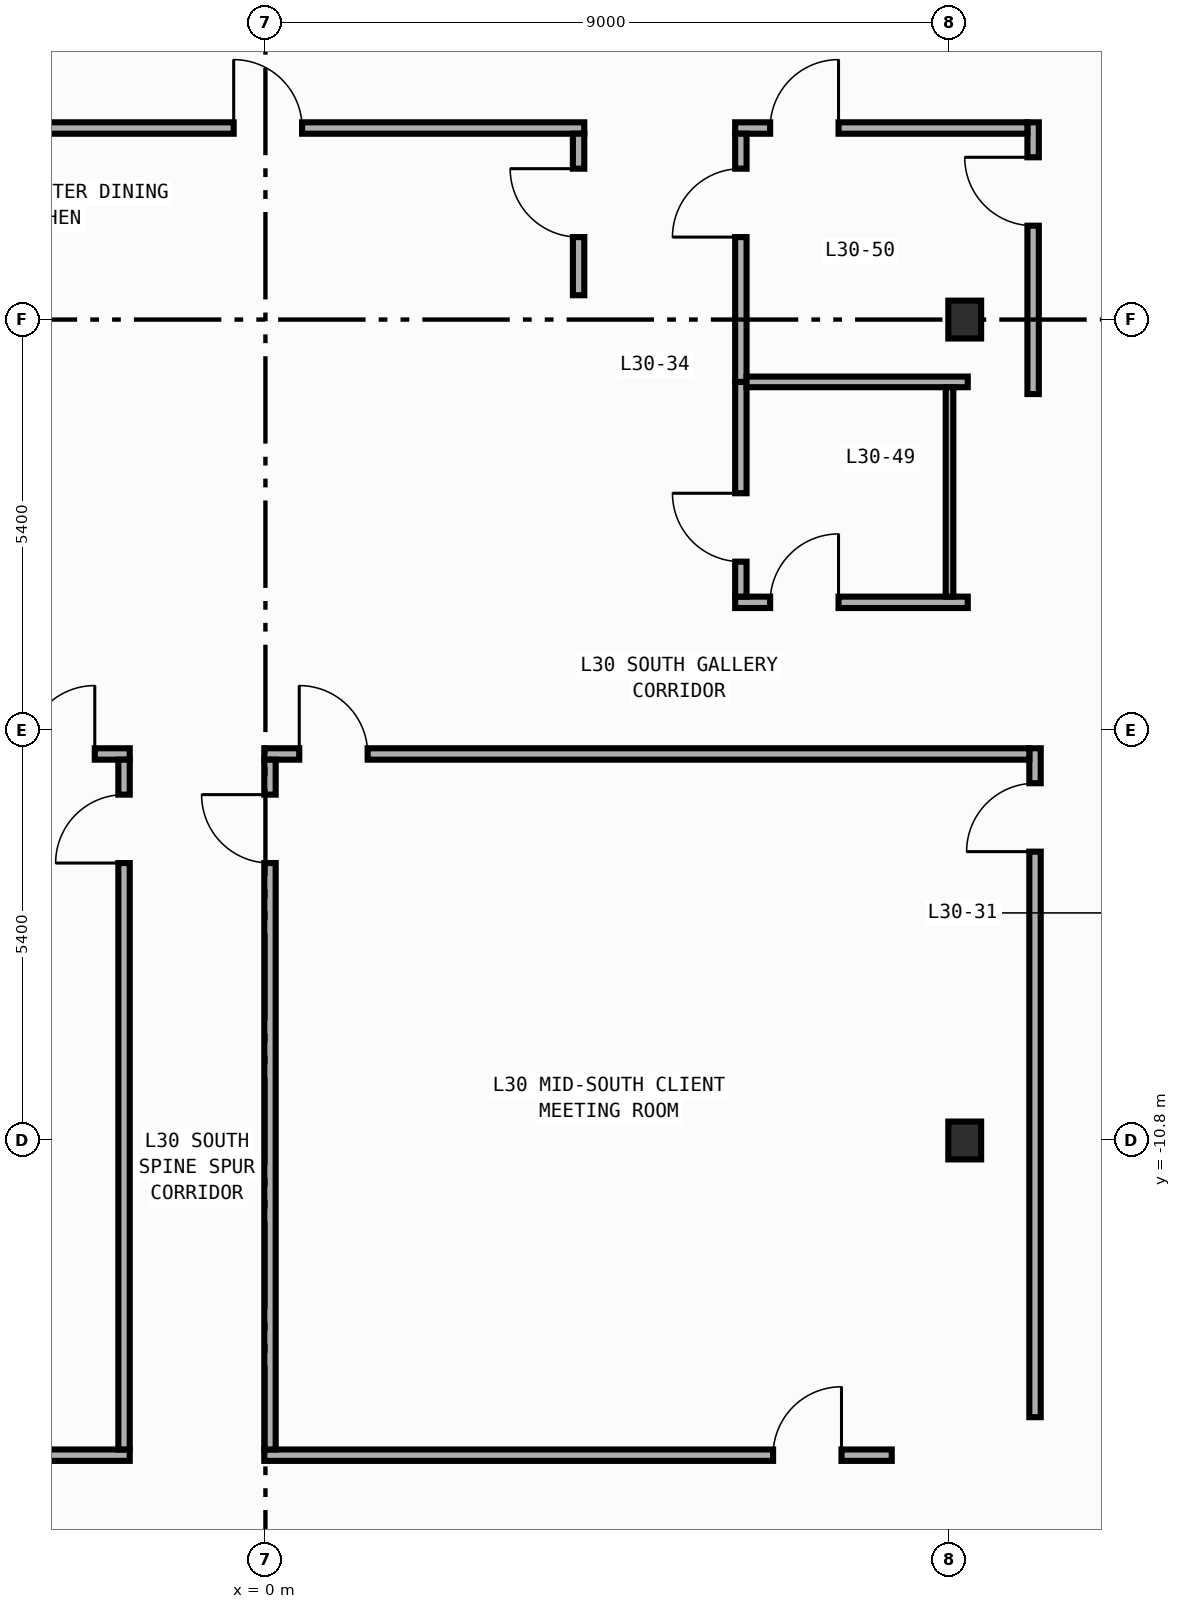
"""IFC4 building model, lengths in metres.
Left out: names, types, materials, properties, quantities, classifications, styles, units other than length and angle.
Written with IfcOpenShell. Run it as: python <this file> out.ifc"""

import sys

from ifc_helpers import new_model, si_unit, direction, frame, frame_2d, origin, origin_2d, place, context, subcontext, project, spatial, rectangle, i_section, extrude, element, fill, save


model = new_model("IFC4")
c1 = context("Model", 3, precision=1e-05, world=origin(), true_north=direction((0.0, 1.0)))
c2 = subcontext(c1, "Body", "Model", "MODEL_VIEW")
j1 = project(units=[si_unit("LENGTHUNIT", "METRE"), si_unit("PLANEANGLEUNIT", "RADIAN")], contexts=[c1])
p1 = place(None, origin())
s1 = spatial("IfcSite", under=j1, at=p1, CompositionType="ELEMENT")
p2 = place(p1, origin())
s2 = spatial("IfcBuilding", under=s1, at=p2, CompositionType="ELEMENT")
p3 = place(p2, frame((0.0, 0.0, 131.0)))
s3 = spatial("IfcBuildingStorey", under=s2, at=p3, CompositionType="ELEMENT", Elevation=131.0)
for number, where, z_axis, x_axis in (
    (1, (9.2, -10.8, 0.0), (0.0, 0.0, 1.0), (1.0, 0.0, 0.0)),
    (2, (9.2, 0.0, 0.0), (0.0, 0.0, 1.0), (1.0, 0.0, 0.0)),
):
    element("IfcColumn", number, at=place(p3, frame(where, z_axis=z_axis, x_axis=x_axis)), inside=s3, PredefinedType="COLUMN", context=c2, shape_type="SweptSolid", body=[
        extrude(i_section(OverallWidth=0.432, OverallDepth=0.498, WebThickness=0.045, FlangeThickness=0.07, FilletRadius=0.022, at=origin_2d()), origin(), (0.0, 0.0, 1.0), 4.2),
    ])
p4 = place(p3, frame((10.1, -0.98, 0.0), z_axis=(0.0, 0.0, 1.0), x_axis=(0.0, 1.0, 0.0)))
e3 = element("IfcWall", 3, at=p4, inside=s3, PredefinedType="PARTITIONING", context=c2, shape_type="SweptSolid", body=[
    extrude(rectangle(XDim=3.575, YDim=0.15, at=frame_2d((1.788, 0.0))), origin(), (0.0, 0.0, 1.0), 3.94),
])
p5 = place(p4, frame((2.215, 0.0, 0.0)))
e4 = element("IfcOpeningElement", 4, at=p5, cuts=e3, PredefinedType="OPENING", context=c2, shape_type="SweptSolid", body=[
    extrude(rectangle(XDim=0.9, YDim=2.15, at=frame_2d((0.45, 1.075))), frame((0.0, 0.085, 0.0), z_axis=(0.0, -1.0, 0.0), x_axis=(1.0, 0.0, 0.0)), (0.0, 0.0, 1.0), 0.17),
])
p6 = place(p3, frame((10.125, -14.44, 0.0), z_axis=(0.0, 0.0, 1.0), x_axis=(0.0, 1.0, 0.0)))
e5 = element("IfcWall", 5, at=p6, inside=s3, PredefinedType="PARTITIONING", context=c2, shape_type="SweptSolid", body=[
    extrude(rectangle(XDim=8.8, YDim=0.15, at=frame_2d((4.4, 0.0))), origin(), (0.0, 0.0, 1.0), 3.94),
])
p7 = place(p6, frame((7.44, 0.0, 0.0)))
e6 = element("IfcOpeningElement", 6, at=p7, cuts=e5, PredefinedType="OPENING", context=c2, shape_type="SweptSolid", body=[
    extrude(rectangle(XDim=0.9, YDim=2.15, at=frame_2d((0.45, 1.075))), frame((0.0, 0.085, 0.0), z_axis=(0.0, -1.0, 0.0), x_axis=(1.0, 0.0, 0.0)), (0.0, 0.0, 1.0), 0.17),
])
p8 = place(p3, frame((6.18, 2.52, 0.0), z_axis=(0.0, 0.0, 1.0), x_axis=(1.0, 0.0, 0.0)))
e7 = element("IfcWall", 7, at=p8, inside=s3, PredefinedType="PARTITIONING", context=c2, shape_type="SweptSolid", body=[
    extrude(rectangle(XDim=3.845, YDim=0.15, at=frame_2d((1.922, 0.0))), origin(), (0.0, 0.0, 1.0), 3.94),
])
p9 = place(p8, frame((0.46, 0.0, 0.0)))
e8 = element("IfcOpeningElement", 8, at=p9, cuts=e7, PredefinedType="OPENING", context=c2, shape_type="SweptSolid", body=[
    extrude(rectangle(XDim=0.9, YDim=2.15, at=frame_2d((0.45, 1.075))), frame((0.0, 0.085, 0.0), z_axis=(0.0, -1.0, 0.0), x_axis=(1.0, 0.0, 0.0)), (0.0, 0.0, 1.0), 0.17),
])
p10 = place(p3, frame((-10.025, 2.52, 0.0), z_axis=(0.0, 0.0, 1.0), x_axis=(1.0, 0.0, 0.0)))
e9 = element("IfcWall", 9, at=p10, inside=s3, PredefinedType="PARTITIONING", context=c2, shape_type="SweptSolid", body=[
    extrude(rectangle(XDim=14.22, YDim=0.15, at=frame_2d((7.11, 0.0))), origin(), (0.0, 0.0, 1.0), 3.94),
])
p11 = place(p10, frame((9.607, 0.0, 0.0)))
e10 = element("IfcOpeningElement", 10, at=p11, cuts=e9, PredefinedType="OPENING", context=c2, shape_type="SweptSolid", body=[
    extrude(rectangle(XDim=0.9, YDim=2.15, at=frame_2d((0.45, 1.075))), frame((0.0, 0.085, 0.0), z_axis=(0.0, -1.0, 0.0), x_axis=(1.0, 0.0, 0.0)), (0.0, 0.0, 1.0), 0.17),
])
p12 = place(p3, frame((6.18, -3.72, 0.0), z_axis=(0.0, 0.0, 1.0), x_axis=(1.0, 0.0, 0.0)))
e11 = element("IfcWall", 11, at=p12, inside=s3, PredefinedType="PARTITIONING", context=c2, shape_type="SweptSolid", body=[
    extrude(rectangle(XDim=3.06, YDim=0.15, at=frame_2d((1.53, 0.0))), origin(), (0.0, 0.0, 1.0), 3.94),
])
p13 = place(p12, frame((0.46, 0.0, 0.0)))
e12 = element("IfcOpeningElement", 12, at=p13, cuts=e11, PredefinedType="OPENING", context=c2, shape_type="SweptSolid", body=[
    extrude(rectangle(XDim=0.9, YDim=2.15, at=frame_2d((0.45, 1.075))), frame((0.0, 0.085, 0.0), z_axis=(0.0, -1.0, 0.0), x_axis=(1.0, 0.0, 0.0)), (0.0, 0.0, 1.0), 0.17),
])
p14 = place(p3, frame((-10.05, -5.715, 0.0), z_axis=(0.0, 0.0, 1.0), x_axis=(1.0, 0.0, 0.0)))
e13 = element("IfcWall", 13, at=p14, inside=s3, PredefinedType="PARTITIONING", context=c2, shape_type="SweptSolid", body=[
    extrude(rectangle(XDim=8.265, YDim=0.15, at=frame_2d((4.133, 0.0))), origin(), (0.0, 0.0, 1.0), 3.94),
])
p15 = place(p14, frame((6.905, 0.0, 0.0)))
e14 = element("IfcOpeningElement", 14, at=p15, cuts=e13, PredefinedType="OPENING", context=c2, shape_type="SweptSolid", body=[
    extrude(rectangle(XDim=0.9, YDim=2.15, at=frame_2d((0.45, 1.075))), frame((0.0, 0.085, 0.0), z_axis=(0.0, -1.0, 0.0), x_axis=(1.0, 0.0, 0.0)), (0.0, 0.0, 1.0), 0.17),
])
p16 = place(p3, frame((-0.015, -5.715, 0.0), z_axis=(0.0, 0.0, 1.0), x_axis=(1.0, 0.0, 0.0)))
e15 = element("IfcWall", 15, at=p16, inside=s3, PredefinedType="PARTITIONING", context=c2, shape_type="SweptSolid", body=[
    extrude(rectangle(XDim=10.065, YDim=0.15, at=frame_2d((5.032, 0.0))), origin(), (0.0, 0.0, 1.0), 3.94),
])
p17 = place(p16, frame((0.46, 0.0, 0.0)))
e16 = element("IfcOpeningElement", 16, at=p17, cuts=e15, PredefinedType="OPENING", context=c2, shape_type="SweptSolid", body=[
    extrude(rectangle(XDim=0.9, YDim=2.15, at=frame_2d((0.45, 1.075))), frame((0.0, 0.085, 0.0), z_axis=(0.0, -1.0, 0.0), x_axis=(1.0, 0.0, 0.0)), (0.0, 0.0, 1.0), 0.17),
])
p18 = place(p3, frame((6.255, -3.645, 0.0), z_axis=(0.0, 0.0, 1.0), x_axis=(0.0, 1.0, 0.0)))
e17 = element("IfcWall", 17, at=p18, inside=s3, PredefinedType="PARTITIONING", context=c2, shape_type="SweptSolid", body=[
    extrude(rectangle(XDim=2.825, YDim=0.15, at=frame_2d((1.413, 0.0))), origin(), (0.0, 0.0, 1.0), 3.94),
])
p19 = place(p18, frame((0.46, 0.0, 0.0)))
e18 = element("IfcOpeningElement", 18, at=p19, cuts=e17, PredefinedType="OPENING", context=c2, shape_type="SweptSolid", body=[
    extrude(rectangle(XDim=0.9, YDim=2.15, at=frame_2d((0.45, 1.075))), frame((0.0, 0.085, 0.0), z_axis=(0.0, -1.0, 0.0), x_axis=(1.0, 0.0, 0.0)), (0.0, 0.0, 1.0), 0.17),
])
p20 = place(p3, frame((6.255, -0.82, 0.0), z_axis=(0.0, 0.0, 1.0), x_axis=(0.0, 1.0, 0.0)))
e19 = element("IfcWall", 19, at=p20, inside=s3, PredefinedType="PARTITIONING", context=c2, shape_type="SweptSolid", body=[
    extrude(rectangle(XDim=3.265, YDim=0.15, at=frame_2d((1.633, 0.0))), origin(), (0.0, 0.0, 1.0), 3.94),
])
p21 = place(p20, frame((1.905, 0.0, 0.0)))
e20 = element("IfcOpeningElement", 20, at=p21, cuts=e19, PredefinedType="OPENING", context=c2, shape_type="SweptSolid", body=[
    extrude(rectangle(XDim=0.9, YDim=2.15, at=frame_2d((0.45, 1.075))), frame((0.0, 0.085, 0.0), z_axis=(0.0, -1.0, 0.0), x_axis=(1.0, 0.0, 0.0)), (0.0, 0.0, 1.0), 0.17),
])
p22 = place(p3, frame((4.12, 0.32, 0.0), z_axis=(0.0, 0.0, 1.0), x_axis=(0.0, 1.0, 0.0)))
e21 = element("IfcWall", 21, at=p22, inside=s3, PredefinedType="PARTITIONING", context=c2, shape_type="SweptSolid", body=[
    extrude(rectangle(XDim=2.125, YDim=0.15, at=frame_2d((1.062, 0.0))), origin(), (0.0, 0.0, 1.0), 3.94),
])
p23 = place(p22, frame((0.765, 0.0, 0.0)))
e22 = element("IfcOpeningElement", 22, at=p23, cuts=e21, PredefinedType="OPENING", context=c2, shape_type="SweptSolid", body=[
    extrude(rectangle(XDim=0.9, YDim=2.15, at=frame_2d((0.45, 1.075))), frame((0.0, 0.085, 0.0), z_axis=(0.0, -1.0, 0.0), x_axis=(1.0, 0.0, 0.0)), (0.0, 0.0, 1.0), 0.17),
])
p24 = place(p3, frame((-8.24, -14.94, 0.0), z_axis=(0.0, 0.0, 1.0), x_axis=(1.0, 0.0, 0.0)))
e23 = element("IfcWall", 23, at=p24, inside=s3, PredefinedType="PARTITIONING", context=c2, shape_type="SweptSolid", body=[
    extrude(rectangle(XDim=6.455, YDim=0.15, at=frame_2d((3.228, 0.0))), origin(), (0.0, 0.0, 1.0), 3.94),
])
p25 = place(p24, frame((0.662, 0.0, 0.0)))
e24 = element("IfcOpeningElement", 24, at=p25, cuts=e23, PredefinedType="OPENING", context=c2, shape_type="SweptSolid", body=[
    extrude(rectangle(XDim=0.9, YDim=2.15, at=frame_2d((0.45, 1.075))), frame((0.0, 0.085, 0.0), z_axis=(0.0, -1.0, 0.0), x_axis=(1.0, 0.0, 0.0)), (0.0, 0.0, 1.0), 0.17),
])
p26 = place(p3, frame((-0.015, -14.94, 0.0), z_axis=(0.0, 0.0, 1.0), x_axis=(1.0, 0.0, 0.0)))
e25 = element("IfcWall", 25, at=p26, inside=s3, PredefinedType="PARTITIONING", context=c2, shape_type="SweptSolid", body=[
    extrude(rectangle(XDim=8.255, YDim=0.15, at=frame_2d((4.127, 0.0))), origin(), (0.0, 0.0, 1.0), 3.94),
])
p27 = place(p26, frame((6.694, 0.0, 0.0)))
e26 = element("IfcOpeningElement", 26, at=p27, cuts=e25, PredefinedType="OPENING", context=c2, shape_type="SweptSolid", body=[
    extrude(rectangle(XDim=0.9, YDim=2.15, at=frame_2d((0.45, 1.075))), frame((0.0, 0.085, 0.0), z_axis=(0.0, -1.0, 0.0), x_axis=(1.0, 0.0, 0.0)), (0.0, 0.0, 1.0), 0.17),
])
p28 = place(p3, frame((-1.86, -14.865, 0.0), z_axis=(0.0, 0.0, 1.0), x_axis=(0.0, 1.0, 0.0)))
e27 = element("IfcWall", 27, at=p28, inside=s3, PredefinedType="PARTITIONING", context=c2, shape_type="SweptSolid", body=[
    extrude(rectangle(XDim=9.075, YDim=0.15, at=frame_2d((4.538, 0.0))), origin(), (0.0, 0.0, 1.0), 3.94),
])
p29 = place(p28, frame((7.715, 0.0, 0.0)))
e28 = element("IfcOpeningElement", 28, at=p29, cuts=e27, PredefinedType="OPENING", context=c2, shape_type="SweptSolid", body=[
    extrude(rectangle(XDim=0.9, YDim=2.15, at=frame_2d((0.45, 1.075))), frame((0.0, 0.085, 0.0), z_axis=(0.0, -1.0, 0.0), x_axis=(1.0, 0.0, 0.0)), (0.0, 0.0, 1.0), 0.17),
])
p30 = place(p3, frame((0.06, -14.865, 0.0), z_axis=(0.0, 0.0, 1.0), x_axis=(0.0, 1.0, 0.0)))
e29 = element("IfcWall", 29, at=p30, inside=s3, PredefinedType="PARTITIONING", context=c2, shape_type="SweptSolid", body=[
    extrude(rectangle(XDim=9.075, YDim=0.15, at=frame_2d((4.538, 0.0))), origin(), (0.0, 0.0, 1.0), 3.94),
])
p31 = place(p30, frame((7.715, 0.0, 0.0)))
e30 = element("IfcOpeningElement", 30, at=p31, cuts=e29, PredefinedType="OPENING", context=c2, shape_type="SweptSolid", body=[
    extrude(rectangle(XDim=0.9, YDim=2.15, at=frame_2d((0.45, 1.075))), frame((0.0, 0.085, 0.0), z_axis=(0.0, -1.0, 0.0), x_axis=(1.0, 0.0, 0.0)), (0.0, 0.0, 1.0), 0.17),
])
p32 = place(p3, frame((6.33, -0.82, 0.0), z_axis=(0.0, 0.0, 1.0), x_axis=(1.0, 0.0, 0.0)))
e31 = element("IfcWall", 31, at=p32, inside=s3, PredefinedType="PARTITIONING", context=c2, shape_type="SweptSolid", body=[
    extrude(rectangle(XDim=2.91, YDim=0.14, at=frame_2d((1.455, 0.0))), origin(), (0.0, 0.0, 1.0), 3.94),
])
p33 = place(p3, frame((9.0, -0.89, 0.0), z_axis=(0.0, 0.0, 1.0), x_axis=(0.0, -1.0, 0.0)))
e32 = element("IfcWall", 32, at=p33, inside=s3, PredefinedType="PARTITIONING", context=c2, shape_type="SweptSolid", body=[
    extrude(rectangle(XDim=2.755, YDim=0.1, at=frame_2d((1.377, 0.0))), origin(), (0.0, 0.0, 1.0), 3.24),
])
p34 = place(p5, origin())
e33 = element("IfcDoor", 33, at=p34, inside=s3, OperationType="SINGLE_SWING_RIGHT", PredefinedType="DOOR", context=c2, shape_type="SweptSolid", body=[
    extrude(rectangle(XDim=0.9, YDim=2.15, at=frame_2d((0.45, 1.075))), frame((0.0, 0.025, 0.0), z_axis=(0.0, -1.0, 0.0), x_axis=(1.0, 0.0, 0.0)), (0.0, 0.0, 1.0), 0.05),
])
fill(e4, e33)
p35 = place(p7, origin())
e34 = element("IfcDoor", 34, at=p35, inside=s3, OperationType="SINGLE_SWING_LEFT", PredefinedType="DOOR", context=c2, shape_type="SweptSolid", body=[
    extrude(rectangle(XDim=0.9, YDim=2.15, at=frame_2d((0.45, 1.075))), frame((0.0, 0.025, 0.0), z_axis=(0.0, -1.0, 0.0), x_axis=(1.0, 0.0, 0.0)), (0.0, 0.0, 1.0), 0.05),
])
fill(e6, e34)
p36 = place(p9, origin())
e35 = element("IfcDoor", 35, at=p36, inside=s3, OperationType="SINGLE_SWING_RIGHT", PredefinedType="DOOR", context=c2, shape_type="SweptSolid", body=[
    extrude(rectangle(XDim=0.9, YDim=2.15, at=frame_2d((0.45, 1.075))), frame((0.0, 0.025, 0.0), z_axis=(0.0, -1.0, 0.0), x_axis=(1.0, 0.0, 0.0)), (0.0, 0.0, 1.0), 0.05),
])
fill(e8, e35)
p37 = place(p11, origin())
e36 = element("IfcDoor", 36, at=p37, inside=s3, OperationType="SINGLE_SWING_LEFT", PredefinedType="DOOR", context=c2, shape_type="SweptSolid", body=[
    extrude(rectangle(XDim=0.9, YDim=2.15, at=frame_2d((0.45, 1.075))), frame((0.0, 0.025, 0.0), z_axis=(0.0, -1.0, 0.0), x_axis=(1.0, 0.0, 0.0)), (0.0, 0.0, 1.0), 0.05),
])
fill(e10, e36)
p38 = place(p13, origin())
e37 = element("IfcDoor", 37, at=p38, inside=s3, OperationType="SINGLE_SWING_RIGHT", PredefinedType="DOOR", context=c2, shape_type="SweptSolid", body=[
    extrude(rectangle(XDim=0.9, YDim=2.15, at=frame_2d((0.45, 1.075))), frame((0.0, 0.025, 0.0), z_axis=(0.0, -1.0, 0.0), x_axis=(1.0, 0.0, 0.0)), (0.0, 0.0, 1.0), 0.05),
])
fill(e12, e37)
p39 = place(p15, origin())
e38 = element("IfcDoor", 38, at=p39, inside=s3, OperationType="SINGLE_SWING_RIGHT", PredefinedType="DOOR", context=c2, shape_type="SweptSolid", body=[
    extrude(rectangle(XDim=0.9, YDim=2.15, at=frame_2d((0.45, 1.075))), frame((0.0, 0.025, 0.0), z_axis=(0.0, -1.0, 0.0), x_axis=(1.0, 0.0, 0.0)), (0.0, 0.0, 1.0), 0.05),
])
fill(e14, e38)
p40 = place(p17, origin())
e39 = element("IfcDoor", 39, at=p40, inside=s3, OperationType="SINGLE_SWING_LEFT", PredefinedType="DOOR", context=c2, shape_type="SweptSolid", body=[
    extrude(rectangle(XDim=0.9, YDim=2.15, at=frame_2d((0.45, 1.075))), frame((0.0, 0.025, 0.0), z_axis=(0.0, -1.0, 0.0), x_axis=(1.0, 0.0, 0.0)), (0.0, 0.0, 1.0), 0.05),
])
fill(e16, e39)
p41 = place(p19, origin())
e40 = element("IfcDoor", 40, at=p41, inside=s3, OperationType="SINGLE_SWING_RIGHT", PredefinedType="DOOR", context=c2, shape_type="SweptSolid", body=[
    extrude(rectangle(XDim=0.9, YDim=2.15, at=frame_2d((0.45, 1.075))), frame((0.0, 0.025, 0.0), z_axis=(0.0, -1.0, 0.0), x_axis=(1.0, 0.0, 0.0)), (0.0, 0.0, 1.0), 0.05),
])
fill(e18, e40)
p42 = place(p21, origin())
e41 = element("IfcDoor", 41, at=p42, inside=s3, OperationType="SINGLE_SWING_LEFT", PredefinedType="DOOR", context=c2, shape_type="SweptSolid", body=[
    extrude(rectangle(XDim=0.9, YDim=2.15, at=frame_2d((0.45, 1.075))), frame((0.0, 0.025, 0.0), z_axis=(0.0, -1.0, 0.0), x_axis=(1.0, 0.0, 0.0)), (0.0, 0.0, 1.0), 0.05),
])
fill(e20, e41)
p43 = place(p23, origin())
e42 = element("IfcDoor", 42, at=p43, inside=s3, OperationType="SINGLE_SWING_RIGHT", PredefinedType="DOOR", context=c2, shape_type="SweptSolid", body=[
    extrude(rectangle(XDim=0.9, YDim=2.15, at=frame_2d((0.45, 1.075))), frame((0.0, 0.025, 0.0), z_axis=(0.0, -1.0, 0.0), x_axis=(1.0, 0.0, 0.0)), (0.0, 0.0, 1.0), 0.05),
])
fill(e22, e42)
p44 = place(p27, origin())
e43 = element("IfcDoor", 43, at=p44, inside=s3, OperationType="SINGLE_SWING_RIGHT", PredefinedType="DOOR", context=c2, shape_type="SweptSolid", body=[
    extrude(rectangle(XDim=0.9, YDim=2.15, at=frame_2d((0.45, 1.075))), frame((0.0, 0.025, 0.0), z_axis=(0.0, -1.0, 0.0), x_axis=(1.0, 0.0, 0.0)), (0.0, 0.0, 1.0), 0.05),
])
fill(e26, e43)
p45 = place(p29, origin())
e44 = element("IfcDoor", 44, at=p45, inside=s3, OperationType="SINGLE_SWING_LEFT", PredefinedType="DOOR", context=c2, shape_type="SweptSolid", body=[
    extrude(rectangle(XDim=0.9, YDim=2.15, at=frame_2d((0.45, 1.075))), frame((0.0, 0.025, 0.0), z_axis=(0.0, -1.0, 0.0), x_axis=(1.0, 0.0, 0.0)), (0.0, 0.0, 1.0), 0.05),
])
fill(e28, e44)
p46 = place(p31, origin())
e45 = element("IfcDoor", 45, at=p46, inside=s3, OperationType="SINGLE_SWING_RIGHT", PredefinedType="DOOR", context=c2, shape_type="SweptSolid", body=[
    extrude(rectangle(XDim=0.9, YDim=2.15, at=frame_2d((0.45, 1.075))), frame((0.0, 0.025, 0.0), z_axis=(0.0, -1.0, 0.0), x_axis=(1.0, 0.0, 0.0)), (0.0, 0.0, 1.0), 0.05),
])
fill(e30, e45)
save(model, sys.argv[1])
